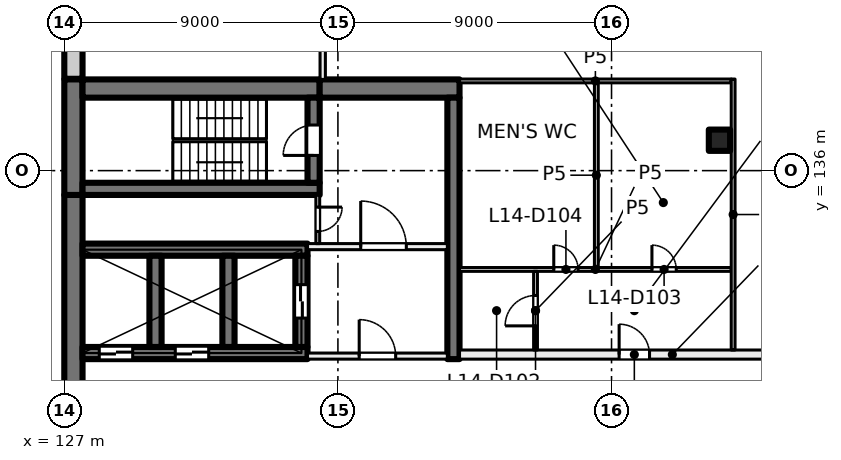
"""IFC4 building model, lengths in metres.
Left out: names, types, materials, properties, quantities, classifications, styles, units other than length and angle.
Written with IfcOpenShell. Run it as: python <this file> out.ifc"""

import sys

from ifc_helpers import new_model, si_unit, direction, frame, frame_2d, origin, origin_2d, place, context, subcontext, project, spatial, rectangle, extrude, element, fill, save


model = new_model("IFC4")
c1 = context("Model", 3, precision=1e-05, world=origin(), true_north=direction((0.0, 1.0)))
c2 = subcontext(c1, "Body", "Model", "MODEL_VIEW")
j1 = project(units=[si_unit("LENGTHUNIT", "METRE"), si_unit("PLANEANGLEUNIT", "RADIAN")], contexts=[c1])
p1 = place(None, origin())
s1 = spatial("IfcSite", under=j1, at=p1, CompositionType="ELEMENT")
p2 = place(p1, origin())
s2 = spatial("IfcBuilding", under=s1, at=p2, CompositionType="ELEMENT")
p3 = place(p2, frame((0.0, 0.0, 63.5)))
s3 = spatial("IfcBuildingStorey", under=s2, at=p3, CompositionType="ELEMENT", Elevation=63.5)
p4 = place(p3, frame((148.55, 137.0, 0.0), z_axis=(0.0, 0.0, 1.0), x_axis=(1.0, 0.0, 0.0)))
e1 = element("IfcColumn", 1, at=p4, inside=s3, PredefinedType="COLUMN", context=c2, shape_type="SweptSolid", body=[
    extrude(rectangle(XDim=0.7, YDim=0.7, at=origin_2d()), origin(), (0.0, 0.0, 1.0), 4.0),
])
p5 = place(p3, frame((127.3, 120.8, 0.0), z_axis=(0.0, 0.0, 1.0), x_axis=(0.0, 1.0, 0.0)))
e2 = element("IfcWall", 2, at=p5, inside=s3, PredefinedType="SHEAR", context=c2, shape_type="SweptSolid", body=[
    extrude(rectangle(XDim=14.4, YDim=0.6, at=frame_2d((7.2, 0.0))), origin(), (0.0, 0.0, 1.0), 4.0),
])
p6 = place(p3, frame((127.3, 135.2, 0.0), z_axis=(0.0, 0.0, 1.0), x_axis=(0.0, 1.0, 0.0)))
e3 = element("IfcWall", 3, at=p6, inside=s3, PredefinedType="SHEAR", context=c2, shape_type="SweptSolid", body=[
    extrude(rectangle(XDim=3.8, YDim=0.6, at=frame_2d((1.9, 0.0))), origin(), (0.0, 0.0, 1.0), 4.0),
])
p7 = place(p3, frame((127.6, 138.7, 0.0), z_axis=(0.0, 0.0, 1.0), x_axis=(1.0, 0.0, 0.0)))
e4 = element("IfcWall", 4, at=p7, inside=s3, PredefinedType="SHEAR", context=c2, shape_type="SweptSolid", body=[
    extrude(rectangle(XDim=7.8, YDim=0.6, at=frame_2d((3.9, 0.0))), origin(), (0.0, 0.0, 1.0), 4.0),
])
p8 = place(p3, frame((135.4, 138.7, 0.0), z_axis=(0.0, 0.0, 1.0), x_axis=(1.0, 0.0, 0.0)))
e5 = element("IfcWall", 5, at=p8, inside=s3, PredefinedType="SHEAR", context=c2, shape_type="SweptSolid", body=[
    extrude(rectangle(XDim=4.6, YDim=0.6, at=frame_2d((2.3, 0.0))), origin(), (0.0, 0.0, 1.0), 4.0),
])
p9 = place(p3, frame((127.6, 135.4, 0.0), z_axis=(0.0, 0.0, 1.0), x_axis=(1.0, 0.0, 0.0)))
e6 = element("IfcWall", 6, at=p9, inside=s3, PredefinedType="SHEAR", context=c2, shape_type="SweptSolid", body=[
    extrude(rectangle(XDim=7.8, YDim=0.4, at=frame_2d((3.9, 0.0))), origin(), (0.0, 0.0, 1.0), 4.0),
])
p10 = place(p3, frame((135.2, 135.6, 0.0), z_axis=(0.0, 0.0, 1.0), x_axis=(0.0, 1.0, 0.0)))
e7 = element("IfcWall", 7, at=p10, inside=s3, PredefinedType="SHEAR", context=c2, shape_type="SweptSolid", body=[
    extrude(rectangle(XDim=2.8, YDim=0.4, at=frame_2d((1.4, 0.0))), origin(), (0.0, 0.0, 1.0), 4.0),
])
p11 = place(p10, frame((0.9, 0.0, 0.0)))
e8 = element("IfcOpeningElement", 8, at=p11, cuts=e7, PredefinedType="OPENING", context=c2, shape_type="SweptSolid", body=[
    extrude(rectangle(XDim=1.0, YDim=2.1, at=frame_2d((0.5, 1.05))), frame((0.0, 0.21, 0.0), z_axis=(0.0, -1.0, 0.0), x_axis=(1.0, 0.0, 0.0)), (0.0, 0.0, 1.0), 0.42),
])
p12 = place(p3, frame((127.6, 130.0, 0.0), z_axis=(0.0, 0.0, 1.0), x_axis=(1.0, 0.0, 0.0)))
e9 = element("IfcWall", 9, at=p12, inside=s3, PredefinedType="SHEAR", context=c2, shape_type="SweptSolid", body=[
    extrude(rectangle(XDim=7.4, YDim=0.4, at=frame_2d((3.7, 0.0))), origin(), (0.0, 0.0, 1.0), 4.0),
])
p13 = place(p12, frame((0.55, 0.0, 0.0)))
e10 = element("IfcOpeningElement", 10, at=p13, cuts=e9, PredefinedType="OPENING", context=c2, shape_type="SweptSolid", body=[
    extrude(rectangle(XDim=1.1, YDim=2.1, at=frame_2d((0.55, 1.05))), frame((0.0, 0.21, 0.0), z_axis=(0.0, -1.0, 0.0), x_axis=(1.0, 0.0, 0.0)), (0.0, 0.0, 1.0), 0.42),
])
p14 = place(p12, frame((3.05, 0.0, 0.0)))
e11 = element("IfcOpeningElement", 11, at=p14, cuts=e9, PredefinedType="OPENING", context=c2, shape_type="SweptSolid", body=[
    extrude(rectangle(XDim=1.1, YDim=2.1, at=frame_2d((0.55, 1.05))), frame((0.0, 0.21, 0.0), z_axis=(0.0, -1.0, 0.0), x_axis=(1.0, 0.0, 0.0)), (0.0, 0.0, 1.0), 0.42),
])
p15 = place(p3, frame((127.6, 133.4, 0.0), z_axis=(0.0, 0.0, 1.0), x_axis=(1.0, 0.0, 0.0)))
e12 = element("IfcWall", 12, at=p15, inside=s3, PredefinedType="SHEAR", context=c2, shape_type="SweptSolid", body=[
    extrude(rectangle(XDim=7.4, YDim=0.4, at=frame_2d((3.7, 0.0))), origin(), (0.0, 0.0, 1.0), 4.0),
])
for number, where, z_axis, x_axis in (
    (13, (130.0, 130.2, 0.0), (0.0, 0.0, 1.0), (0.0, 1.0, 0.0)),
    (14, (132.4, 130.2, 0.0), (0.0, 0.0, 1.0), (0.0, 1.0, 0.0)),
):
    element("IfcWall", number, at=place(p3, frame(where, z_axis=z_axis, x_axis=x_axis)), inside=s3, PredefinedType="SHEAR", context=c2, shape_type="SweptSolid", body=[
        extrude(rectangle(XDim=3.0, YDim=0.4, at=frame_2d((1.5, 0.0))), origin(), (0.0, 0.0, 1.0), 4.0),
    ])
p16 = place(p3, frame((134.8, 130.2, 0.0), z_axis=(0.0, 0.0, 1.0), x_axis=(0.0, 1.0, 0.0)))
e15 = element("IfcWall", 15, at=p16, inside=s3, PredefinedType="SHEAR", context=c2, shape_type="SweptSolid", body=[
    extrude(rectangle(XDim=3.0, YDim=0.4, at=frame_2d((1.5, 0.0))), origin(), (0.0, 0.0, 1.0), 4.0),
])
p17 = place(p16, frame((0.95, 0.0, 0.0)))
e16 = element("IfcOpeningElement", 16, at=p17, cuts=e15, PredefinedType="OPENING", context=c2, shape_type="SweptSolid", body=[
    extrude(rectangle(XDim=1.1, YDim=2.1, at=frame_2d((0.55, 1.05))), frame((0.0, 0.21, 0.0), z_axis=(0.0, -1.0, 0.0), x_axis=(1.0, 0.0, 0.0)), (0.0, 0.0, 1.0), 0.42),
])
p18 = place(p3, frame((139.8, 129.8, 0.0), z_axis=(0.0, 0.0, 1.0), x_axis=(0.0, 1.0, 0.0)))
e17 = element("IfcWall", 17, at=p18, inside=s3, PredefinedType="SHEAR", context=c2, shape_type="SweptSolid", body=[
    extrude(rectangle(XDim=8.6, YDim=0.4, at=frame_2d((4.3, 0.0))), origin(), (0.0, 0.0, 1.0), 4.0),
])
p19 = place(p3, frame((127.3, 139.02, 0.0), z_axis=(0.0, 0.0, 1.0), x_axis=(0.0, 1.0, 0.0)))
e18 = element("IfcWall", 18, at=p19, inside=s3, PredefinedType="SOLIDWALL", context=c2, shape_type="SweptSolid", body=[
    extrude(rectangle(XDim=2.98, YDim=0.6, at=frame_2d((1.49, 0.0))), origin(), (0.0, 0.0, 1.0), 3.625),
])
p20 = place(p3, frame((135.0, 129.9, 0.0), z_axis=(0.0, 0.0, 1.0), x_axis=(1.0, 0.0, 0.0)))
e19 = element("IfcWall", 19, at=p20, inside=s3, PredefinedType="PARTITIONING", context=c2, shape_type="SweptSolid", body=[
    extrude(rectangle(XDim=4.6, YDim=0.2, at=frame_2d((2.3, 0.0))), origin(), (0.0, 0.0, 1.0), 3.625),
])
p21 = place(p20, frame((1.7, 0.0, 0.0)))
e20 = element("IfcOpeningElement", 20, at=p21, cuts=e19, PredefinedType="OPENING", context=c2, shape_type="SweptSolid", body=[
    extrude(rectangle(XDim=1.2, YDim=2.1, at=frame_2d((0.6, 1.05))), frame((0.0, 0.11, 0.0), z_axis=(0.0, -1.0, 0.0), x_axis=(1.0, 0.0, 0.0)), (0.0, 0.0, 1.0), 0.22),
])
p22 = place(p3, frame((135.0, 133.5, 0.0), z_axis=(0.0, 0.0, 1.0), x_axis=(1.0, 0.0, 0.0)))
e21 = element("IfcWall", 21, at=p22, inside=s3, PredefinedType="PARTITIONING", context=c2, shape_type="SweptSolid", body=[
    extrude(rectangle(XDim=4.6, YDim=0.2, at=frame_2d((2.3, 0.0))), origin(), (0.0, 0.0, 1.0), 3.625),
])
p23 = place(p22, frame((1.75, 0.0, 0.0)))
e22 = element("IfcOpeningElement", 22, at=p23, cuts=e21, PredefinedType="OPENING", context=c2, shape_type="SweptSolid", body=[
    extrude(rectangle(XDim=1.5, YDim=2.1, at=frame_2d((0.75, 1.05))), frame((0.0, 0.11, 0.0), z_axis=(0.0, -1.0, 0.0), x_axis=(1.0, 0.0, 0.0)), (0.0, 0.0, 1.0), 0.22),
])
p24 = place(p3, frame((135.337, 135.2, 0.0), z_axis=(0.0, 0.0, 1.0), x_axis=(0.0, -1.0, 0.0)))
e23 = element("IfcWall", 23, at=p24, inside=s3, PredefinedType="PARTITIONING", context=c2, shape_type="SweptSolid", body=[
    extrude(rectangle(XDim=1.6, YDim=0.125, at=frame_2d((0.8, 0.0))), origin(), (0.0, 0.0, 1.0), 3.625),
])
p25 = place(p24, frame((0.4, 0.0, 0.0)))
e24 = element("IfcOpeningElement", 24, at=p25, cuts=e23, PredefinedType="OPENING", context=c2, shape_type="SweptSolid", body=[
    extrude(rectangle(XDim=0.8, YDim=2.1, at=frame_2d((0.4, 1.05))), frame((0.0, 0.073, 0.0), z_axis=(0.0, -1.0, 0.0), x_axis=(1.0, 0.0, 0.0)), (0.0, 0.0, 1.0), 0.145),
])
p26 = place(p3, frame((135.5, 145.4, 0.0), z_axis=(0.0, 0.0, 1.0), x_axis=(0.0, -1.0, 0.0)))
e25 = element("IfcWall", 25, at=p26, inside=s3, PredefinedType="PARTITIONING", context=c2, shape_type="SweptSolid", body=[
    extrude(rectangle(XDim=6.4, YDim=0.175, at=frame_2d((3.2, 0.0))), origin(), (0.0, 0.0, 1.0), 3.625),
])
p27 = place(p26, frame((2.6, 0.0, 0.0)))
e26 = element("IfcOpeningElement", 26, at=p27, cuts=e25, PredefinedType="OPENING", context=c2, shape_type="SweptSolid", body=[
    extrude(rectangle(XDim=1.2, YDim=2.1, at=frame_2d((0.6, 1.05))), frame((0.0, 0.097, 0.0), z_axis=(0.0, -1.0, 0.0), x_axis=(1.0, 0.0, 0.0)), (0.0, 0.0, 1.0), 0.195),
])
p28 = place(p3, frame((140.0, 129.95, 0.0), z_axis=(0.0, 0.0, 1.0), x_axis=(1.0, 0.0, 0.0)))
e27 = element("IfcWall", 27, at=p28, inside=s3, PredefinedType="PARTITIONING", context=c2, shape_type="SweptSolid", body=[
    extrude(rectangle(XDim=14.0, YDim=0.3, at=frame_2d((7.0, 0.0))), origin(), (0.0, 0.0, 1.0), 3.625),
])
p29 = place(p28, frame((5.25, 0.0, 0.0)))
e28 = element("IfcOpeningElement", 28, at=p29, cuts=e27, PredefinedType="OPENING", context=c2, shape_type="SweptSolid", body=[
    extrude(rectangle(XDim=1.0, YDim=2.1, at=frame_2d((0.5, 1.05))), frame((0.0, 0.16, 0.0), z_axis=(0.0, -1.0, 0.0), x_axis=(1.0, 0.0, 0.0)), (0.0, 0.0, 1.0), 0.32),
])
p30 = place(p28, frame((10.6, 0.0, 0.0)))
e29 = element("IfcOpeningElement", 29, at=p30, cuts=e27, PredefinedType="OPENING", context=c2, shape_type="SweptSolid", body=[
    extrude(rectangle(XDim=1.8, YDim=2.1, at=frame_2d((0.9, 1.05))), frame((0.0, 0.16, 0.0), z_axis=(0.0, -1.0, 0.0), x_axis=(1.0, 0.0, 0.0)), (0.0, 0.0, 1.0), 0.32),
])
p31 = place(p3, frame((140.0, 132.75, 0.0), z_axis=(0.0, 0.0, 1.0), x_axis=(1.0, 0.0, 0.0)))
e30 = element("IfcWall", 30, at=p31, inside=s3, PredefinedType="PARTITIONING", context=c2, shape_type="SweptSolid", body=[
    extrude(rectangle(XDim=8.938, YDim=0.125, at=frame_2d((4.469, 0.0))), origin(), (0.0, 0.0, 1.0), 3.625),
])
p32 = place(p31, frame((6.329, 0.0, 0.0)))
e31 = element("IfcOpeningElement", 31, at=p32, cuts=e30, PredefinedType="OPENING", context=c2, shape_type="SweptSolid", body=[
    extrude(rectangle(XDim=0.8, YDim=2.1, at=frame_2d((0.4, 1.05))), frame((0.0, 0.073, 0.0), z_axis=(0.0, -1.0, 0.0), x_axis=(1.0, 0.0, 0.0)), (0.0, 0.0, 1.0), 0.145),
])
p33 = place(p31, frame((3.1, 0.0, 0.0)))
e32 = element("IfcOpeningElement", 32, at=p33, cuts=e30, PredefinedType="OPENING", context=c2, shape_type="SweptSolid", body=[
    extrude(rectangle(XDim=0.8, YDim=2.1, at=frame_2d((0.4, 1.05))), frame((0.0, 0.073, 0.0), z_axis=(0.0, -1.0, 0.0), x_axis=(1.0, 0.0, 0.0)), (0.0, 0.0, 1.0), 0.145),
])
p34 = place(p3, frame((140.0, 138.95, 0.0), z_axis=(0.0, 0.0, 1.0), x_axis=(1.0, 0.0, 0.0)))
e33 = element("IfcWall", 33, at=p34, inside=s3, PredefinedType="PARTITIONING", context=c2, shape_type="SweptSolid", body=[
    extrude(rectangle(XDim=8.938, YDim=0.125, at=frame_2d((4.469, 0.0))), origin(), (0.0, 0.0, 1.0), 3.625),
])
p35 = place(p3, frame((142.5, 130.1, 0.0), z_axis=(0.0, 0.0, 1.0), x_axis=(0.0, 1.0, 0.0)))
e34 = element("IfcWall", 34, at=p35, inside=s3, PredefinedType="PARTITIONING", context=c2, shape_type="SweptSolid", body=[
    extrude(rectangle(XDim=2.588, YDim=0.125, at=frame_2d((1.294, 0.0))), origin(), (0.0, 0.0, 1.0), 3.625),
])
p36 = place(p35, frame((0.794, 0.0, 0.0)))
e35 = element("IfcOpeningElement", 35, at=p36, cuts=e34, PredefinedType="OPENING", context=c2, shape_type="SweptSolid", body=[
    extrude(rectangle(XDim=1.0, YDim=2.1, at=frame_2d((0.5, 1.05))), frame((0.0, 0.073, 0.0), z_axis=(0.0, -1.0, 0.0), x_axis=(1.0, 0.0, 0.0)), (0.0, 0.0, 1.0), 0.145),
])
p37 = place(p3, frame((144.5, 138.888, 0.0), z_axis=(0.0, 0.0, 1.0), x_axis=(0.0, -1.0, 0.0)))
e36 = element("IfcWall", 36, at=p37, inside=s3, PredefinedType="PARTITIONING", context=c2, shape_type="SweptSolid", body=[
    extrude(rectangle(XDim=6.076, YDim=0.125, at=frame_2d((3.038, 0.0))), origin(), (0.0, 0.0, 1.0), 3.625),
])
p38 = place(p3, frame((149.0, 139.012, 0.0), z_axis=(0.0, 0.0, 1.0), x_axis=(0.0, -1.0, 0.0)))
e37 = element("IfcWall", 37, at=p38, inside=s3, PredefinedType="PARTITIONING", context=c2, shape_type="SweptSolid", body=[
    extrude(rectangle(XDim=8.912, YDim=0.125, at=frame_2d((4.456, 0.0))), origin(), (0.0, 0.0, 1.0), 3.625),
])
p39 = place(p13, origin())
e38 = element("IfcDoor", 38, at=p39, inside=s3, OperationType="DOUBLE_DOOR_SLIDING", PredefinedType="DOOR", context=c2, shape_type="SweptSolid", body=[
    extrude(rectangle(XDim=1.1, YDim=2.1, at=frame_2d((0.55, 1.05))), frame((0.0, 0.025, 0.0), z_axis=(0.0, -1.0, 0.0), x_axis=(1.0, 0.0, 0.0)), (0.0, 0.0, 1.0), 0.05),
])
fill(e10, e38)
p40 = place(p14, origin())
e39 = element("IfcDoor", 39, at=p40, inside=s3, OperationType="DOUBLE_DOOR_SLIDING", PredefinedType="DOOR", context=c2, shape_type="SweptSolid", body=[
    extrude(rectangle(XDim=1.1, YDim=2.1, at=frame_2d((0.55, 1.05))), frame((0.0, 0.025, 0.0), z_axis=(0.0, -1.0, 0.0), x_axis=(1.0, 0.0, 0.0)), (0.0, 0.0, 1.0), 0.05),
])
fill(e11, e39)
p41 = place(p21, origin())
e40 = element("IfcDoor", 40, at=p41, inside=s3, OperationType="DOUBLE_DOOR_SINGLE_SWING", PredefinedType="DOOR", context=c2, shape_type="SweptSolid", body=[
    extrude(rectangle(XDim=1.2, YDim=2.1, at=frame_2d((0.6, 1.05))), frame((0.0, 0.025, 0.0), z_axis=(0.0, -1.0, 0.0), x_axis=(1.0, 0.0, 0.0)), (0.0, 0.0, 1.0), 0.05),
])
fill(e20, e40)
p42 = place(p23, origin())
e41 = element("IfcDoor", 41, at=p42, inside=s3, OperationType="DOUBLE_DOOR_SINGLE_SWING", PredefinedType="DOOR", context=c2, shape_type="SweptSolid", body=[
    extrude(rectangle(XDim=1.5, YDim=2.1, at=frame_2d((0.75, 1.05))), frame((0.0, 0.025, 0.0), z_axis=(0.0, -1.0, 0.0), x_axis=(1.0, 0.0, 0.0)), (0.0, 0.0, 1.0), 0.05),
])
fill(e22, e41)
p43 = place(p11, origin())
e42 = element("IfcDoor", 42, at=p43, inside=s3, OperationType="SINGLE_SWING_LEFT", PredefinedType="DOOR", context=c2, shape_type="SweptSolid", body=[
    extrude(rectangle(XDim=1.0, YDim=2.1, at=frame_2d((0.5, 1.05))), frame((0.0, 0.025, 0.0), z_axis=(0.0, -1.0, 0.0), x_axis=(1.0, 0.0, 0.0)), (0.0, 0.0, 1.0), 0.05),
])
fill(e8, e42)
p44 = place(p25, origin())
e43 = element("IfcDoor", 43, at=p44, inside=s3, OperationType="SINGLE_SWING_RIGHT", PredefinedType="DOOR", context=c2, shape_type="SweptSolid", body=[
    extrude(rectangle(XDim=0.8, YDim=2.1, at=frame_2d((0.4, 1.05))), frame((0.0, 0.025, 0.0), z_axis=(0.0, -1.0, 0.0), x_axis=(1.0, 0.0, 0.0)), (0.0, 0.0, 1.0), 0.05),
])
fill(e24, e43)
p45 = place(p17, origin())
e44 = element("IfcDoor", 44, at=p45, inside=s3, OperationType="DOUBLE_DOOR_SLIDING", PredefinedType="DOOR", context=c2, shape_type="SweptSolid", body=[
    extrude(rectangle(XDim=1.1, YDim=2.1, at=frame_2d((0.55, 1.05))), frame((0.0, 0.025, 0.0), z_axis=(0.0, -1.0, 0.0), x_axis=(1.0, 0.0, 0.0)), (0.0, 0.0, 1.0), 0.05),
])
fill(e16, e44)
p46 = place(p29, origin())
e45 = element("IfcDoor", 45, at=p46, inside=s3, OperationType="SINGLE_SWING_RIGHT", PredefinedType="DOOR", context=c2, shape_type="SweptSolid", body=[
    extrude(rectangle(XDim=1.0, YDim=2.1, at=frame_2d((0.5, 1.05))), frame((0.0, 0.025, 0.0), z_axis=(0.0, -1.0, 0.0), x_axis=(1.0, 0.0, 0.0)), (0.0, 0.0, 1.0), 0.05),
])
fill(e28, e45)
p47 = place(p36, origin())
e46 = element("IfcDoor", 46, at=p47, inside=s3, OperationType="SINGLE_SWING_RIGHT", PredefinedType="DOOR", context=c2, shape_type="SweptSolid", body=[
    extrude(rectangle(XDim=1.0, YDim=2.1, at=frame_2d((0.5, 1.05))), frame((0.0, 0.025, 0.0), z_axis=(0.0, -1.0, 0.0), x_axis=(1.0, 0.0, 0.0)), (0.0, 0.0, 1.0), 0.05),
])
fill(e35, e46)
p48 = place(p32, origin())
e47 = element("IfcDoor", 47, at=p48, inside=s3, OperationType="SINGLE_SWING_RIGHT", PredefinedType="DOOR", context=c2, shape_type="SweptSolid", body=[
    extrude(rectangle(XDim=0.8, YDim=2.1, at=frame_2d((0.4, 1.05))), frame((0.0, 0.025, 0.0), z_axis=(0.0, -1.0, 0.0), x_axis=(1.0, 0.0, 0.0)), (0.0, 0.0, 1.0), 0.05),
])
fill(e31, e47)
p49 = place(p33, origin())
e48 = element("IfcDoor", 48, at=p49, inside=s3, OperationType="SINGLE_SWING_LEFT", PredefinedType="DOOR", context=c2, shape_type="SweptSolid", body=[
    extrude(rectangle(XDim=0.8, YDim=2.1, at=frame_2d((0.4, 1.05))), frame((0.0, 0.025, 0.0), z_axis=(0.0, -1.0, 0.0), x_axis=(1.0, 0.0, 0.0)), (0.0, 0.0, 1.0), 0.05),
])
fill(e32, e48)
save(model, sys.argv[1])
